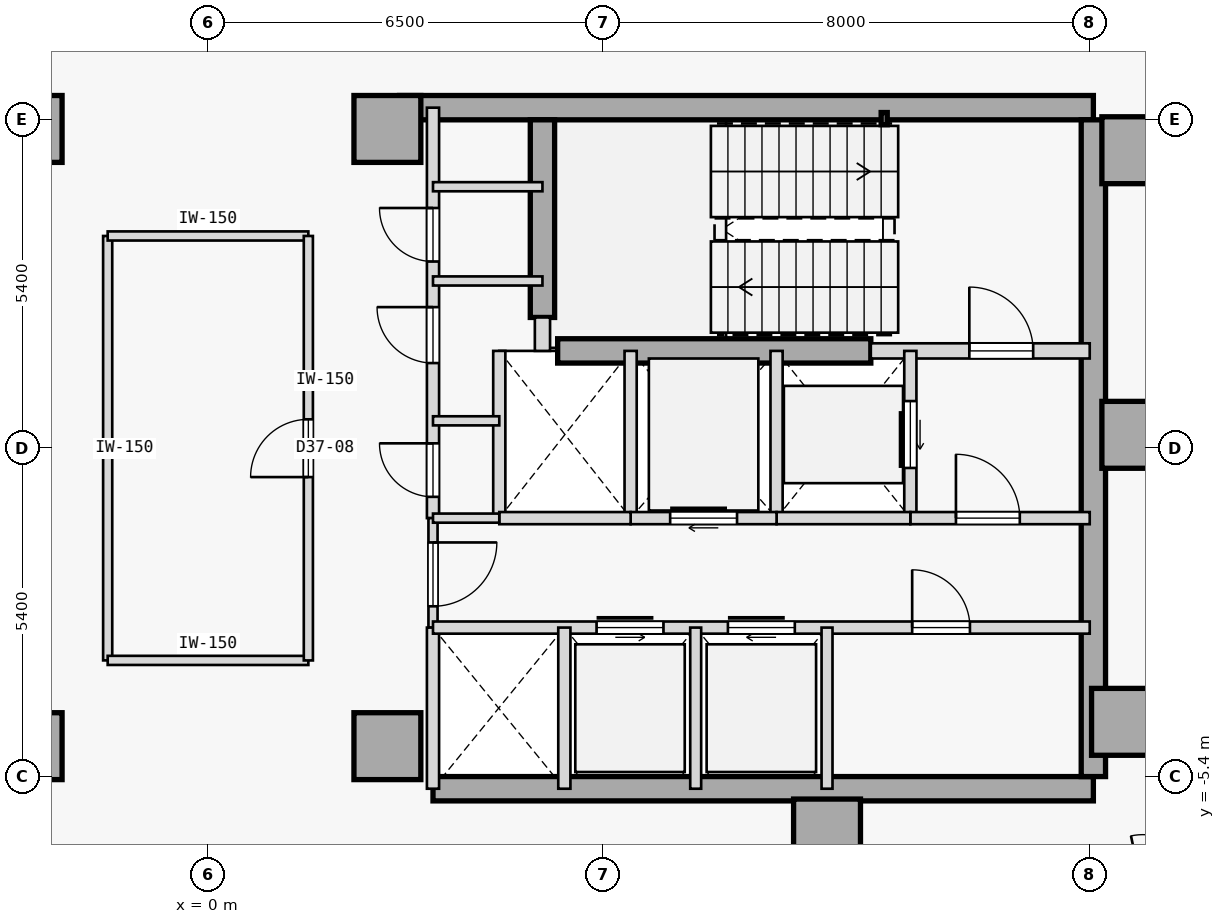
"""IFC4 building model, lengths in metres.
Left out: names, types, materials, properties, quantities, classifications, styles, units other than length and angle.
Written with IfcOpenShell. Run it as: python <this file> out.ifc"""

import sys

from ifc_helpers import new_model, si_unit, direction, frame, frame_2d, origin, origin_2d, place, context, subcontext, project, spatial, rectangle, hollow_rectangle, extrude, element, fill, save


model = new_model("IFC4")
c1 = context("Model", 3, precision=1e-05, world=origin(), true_north=direction((0.0, 1.0)))
c2 = subcontext(c1, "Body", "Model", "MODEL_VIEW")
j1 = project(units=[si_unit("LENGTHUNIT", "METRE"), si_unit("PLANEANGLEUNIT", "RADIAN")], contexts=[c1])
p1 = place(None, origin())
s1 = spatial("IfcSite", under=j1, at=p1, CompositionType="ELEMENT")
p2 = place(p1, origin())
s2 = spatial("IfcBuilding", under=s1, at=p2, CompositionType="ELEMENT")
p3 = place(p2, frame((0.0, 0.0, 147.3)))
s3 = spatial("IfcBuildingStorey", under=s2, at=p3, CompositionType="ELEMENT", Elevation=147.3)
for number, where, z_axis, x_axis in (
    (1, (-2.95, -4.9, 0.0), (0.0, 0.0, 1.0), (1.0, 0.0, 0.0)),
    (2, (-2.95, 5.25, 0.0), (0.0, 0.0, 1.0), (1.0, 0.0, 0.0)),
    (3, (15.25, 4.9, 0.0), (0.0, 0.0, 1.0), (1.0, 0.0, 0.0)),
    (4, (15.25, 0.22, 0.0), (0.0, 0.0, 1.0), (1.0, 0.0, 0.0)),
    (5, (15.08, -4.5, 0.0), (0.0, 0.0, 1.0), (1.0, 0.0, 0.0)),
    (6, (10.18, -6.32, 0.0), (0.0, 0.0, 1.0), (1.0, 0.0, 0.0)),
    (7, (2.95, -4.9, 0.0), (0.0, 0.0, 1.0), (1.0, 0.0, 0.0)),
    (8, (2.95, 5.25, 0.0), (0.0, 0.0, 1.0), (1.0, 0.0, 0.0)),
):
    element("IfcColumn", number, at=place(p3, frame(where, z_axis=z_axis, x_axis=x_axis)), inside=s3, PredefinedType="COLUMN", context=c2, shape_type="SweptSolid", body=[
        extrude(rectangle(XDim=1.1, YDim=1.1, at=origin_2d()), origin(), (0.0, 0.0, 1.0), 4.1),
    ])
p4 = place(p3, frame((3.15, 5.6, 0.0), z_axis=(0.0, 0.0, 1.0), x_axis=(1.0, 0.0, 0.0)))
e9 = element("IfcWall", 9, at=p4, inside=s3, PredefinedType="SHEAR", context=c2, shape_type="SweptSolid", body=[
    extrude(rectangle(XDim=11.41, YDim=0.4, at=frame_2d((5.705, 0.0))), origin(), (0.0, 0.0, 1.0), 3.875),
])
p5 = place(p3, frame((3.7, -5.6, 0.0), z_axis=(0.0, 0.0, 1.0), x_axis=(1.0, 0.0, 0.0)))
e10 = element("IfcWall", 10, at=p5, inside=s3, PredefinedType="SHEAR", context=c2, shape_type="SweptSolid", body=[
    extrude(rectangle(XDim=10.86, YDim=0.4, at=frame_2d((5.43, 0.0))), origin(), (0.0, 0.0, 1.0), 3.875),
])
p6 = place(p3, frame((14.56, -5.4, 0.0), z_axis=(0.0, 0.0, 1.0), x_axis=(0.0, 1.0, 0.0)))
e11 = element("IfcWall", 11, at=p6, inside=s3, PredefinedType="SHEAR", context=c2, shape_type="SweptSolid", body=[
    extrude(rectangle(XDim=10.8, YDim=0.4, at=frame_2d((5.4, 0.0))), origin(), (0.0, 0.0, 1.0), 3.875),
])
p7 = place(p3, frame((5.5, 2.15, 0.0), z_axis=(0.0, 0.0, 1.0), x_axis=(0.0, 1.0, 0.0)))
e12 = element("IfcWall", 12, at=p7, inside=s3, PredefinedType="SHEAR", context=c2, shape_type="SweptSolid", body=[
    extrude(rectangle(XDim=3.25, YDim=0.4, at=frame_2d((1.625, 0.0))), origin(), (0.0, 0.0, 1.0), 3.875),
])
p8 = place(p3, frame((5.75, 1.6, 0.0), z_axis=(0.0, 0.0, 1.0), x_axis=(1.0, 0.0, 0.0)))
e13 = element("IfcWall", 13, at=p8, inside=s3, PredefinedType="SHEAR", context=c2, shape_type="SweptSolid", body=[
    extrude(rectangle(XDim=5.15, YDim=0.4, at=frame_2d((2.575, 0.0))), origin(), (0.0, 0.0, 1.0), 3.875),
])
p9 = place(p3, frame((11.12, 5.42, 0.0), z_axis=(0.0, 0.0, 1.0), x_axis=(1.0, 0.0, 0.0)))
e14 = element("IfcColumn", 14, at=p9, inside=s3, PredefinedType="COLUMN", context=c2, shape_type="SweptSolid", body=[
    extrude(hollow_rectangle(XDim=0.1, YDim=0.2, WallThickness=0.008, at=origin_2d()), origin(), (0.0, 0.0, 1.0), 4.1),
])
p10 = place(p3, frame((10.9, 1.6, 0.0), z_axis=(0.0, 0.0, 1.0), x_axis=(1.0, 0.0, 0.0)))
e15 = element("IfcWall", 15, at=p10, inside=s3, PredefinedType="STANDARD", context=c2, shape_type="SweptSolid", body=[
    extrude(rectangle(XDim=3.6, YDim=0.25, at=frame_2d((1.8, 0.0))), origin(), (0.0, 0.0, 1.0), 3.875),
])
p11 = place(p10, frame((1.62, 0.0, 0.0)))
e16 = element("IfcOpeningElement", 16, at=p11, cuts=e15, PredefinedType="OPENING", context=c2, shape_type="SweptSolid", body=[
    extrude(rectangle(XDim=1.05, YDim=2.15, at=frame_2d((0.525, 1.075))), frame((0.0, 0.135, 0.0), z_axis=(0.0, -1.0, 0.0), x_axis=(1.0, 0.0, 0.0)), (0.0, 0.0, 1.0), 0.27),
])
p12 = place(p3, frame((5.5, 1.6, 0.0), z_axis=(0.0, 0.0, 1.0), x_axis=(0.0, 1.0, 0.0)))
e17 = element("IfcWall", 17, at=p12, inside=s3, PredefinedType="STANDARD", context=c2, shape_type="SweptSolid", body=[
    extrude(rectangle(XDim=0.55, YDim=0.25, at=frame_2d((0.275, 0.0))), origin(), (0.0, 0.0, 1.0), 3.875),
])
p13 = place(p3, frame((3.7, -1.15, 0.0), z_axis=(0.0, 0.0, 1.0), x_axis=(0.0, 1.0, 0.0)))
e18 = element("IfcWall", 18, at=p13, inside=s3, PredefinedType="STANDARD", context=c2, shape_type="SweptSolid", body=[
    extrude(rectangle(XDim=6.75, YDim=0.2, at=frame_2d((3.375, 0.0))), origin(), (0.0, 0.0, 1.0), 3.875),
])
p14 = place(p13, frame((0.35, 0.0, 0.0)))
e19 = element("IfcOpeningElement", 19, at=p14, cuts=e18, PredefinedType="OPENING", context=c2, shape_type="SweptSolid", body=[
    extrude(rectangle(XDim=0.88, YDim=2.15, at=frame_2d((0.44, 1.075))), frame((0.0, 0.11, 0.0), z_axis=(0.0, -1.0, 0.0), x_axis=(1.0, 0.0, 0.0)), (0.0, 0.0, 1.0), 0.22),
])
p15 = place(p13, frame((2.55, 0.0, 0.0)))
e20 = element("IfcOpeningElement", 20, at=p15, cuts=e18, PredefinedType="OPENING", context=c2, shape_type="SweptSolid", body=[
    extrude(rectangle(XDim=0.92, YDim=2.15, at=frame_2d((0.46, 1.075))), frame((0.0, 0.11, 0.0), z_axis=(0.0, -1.0, 0.0), x_axis=(1.0, 0.0, 0.0)), (0.0, 0.0, 1.0), 0.22),
])
p16 = place(p13, frame((4.22, 0.0, 0.0)))
e21 = element("IfcOpeningElement", 21, at=p16, cuts=e18, PredefinedType="OPENING", context=c2, shape_type="SweptSolid", body=[
    extrude(rectangle(XDim=0.88, YDim=2.15, at=frame_2d((0.44, 1.075))), frame((0.0, 0.11, 0.0), z_axis=(0.0, -1.0, 0.0), x_axis=(1.0, 0.0, 0.0)), (0.0, 0.0, 1.0), 0.22),
])
p17 = place(p3, frame((3.7, -2.95, 0.0), z_axis=(0.0, 0.0, 1.0), x_axis=(0.0, 1.0, 0.0)))
e22 = element("IfcWall", 22, at=p17, inside=s3, PredefinedType="PARTITIONING", context=c2, shape_type="SweptSolid", body=[
    extrude(rectangle(XDim=1.8, YDim=0.15, at=frame_2d((0.9, 0.0))), origin(), (0.0, 0.0, 1.0), 3.875),
])
p18 = place(p17, frame((0.35, 0.0, 0.0)))
e23 = element("IfcOpeningElement", 23, at=p18, cuts=e22, PredefinedType="OPENING", context=c2, shape_type="SweptSolid", body=[
    extrude(rectangle(XDim=1.05, YDim=2.18, at=frame_2d((0.525, 1.09))), frame((0.0, 0.085, 0.0), z_axis=(0.0, -1.0, 0.0), x_axis=(1.0, 0.0, 0.0)), (0.0, 0.0, 1.0), 0.17),
])
p19 = place(p3, frame((3.7, -5.6, 0.0), z_axis=(0.0, 0.0, 1.0), x_axis=(0.0, 1.0, 0.0)))
e24 = element("IfcWall", 24, at=p19, inside=s3, PredefinedType="STANDARD", context=c2, shape_type="SweptSolid", body=[
    extrude(rectangle(XDim=2.65, YDim=0.2, at=frame_2d((1.325, 0.0))), origin(), (0.0, 0.0, 1.0), 3.875),
])
p20 = place(p3, frame((11.55, -1.15, 0.0), z_axis=(0.0, 0.0, 1.0), x_axis=(0.0, 1.0, 0.0)))
e25 = element("IfcWall", 25, at=p20, inside=s3, PredefinedType="STANDARD", context=c2, shape_type="SweptSolid", body=[
    extrude(rectangle(XDim=2.75, YDim=0.2, at=frame_2d((1.375, 0.0))), origin(), (0.0, 0.0, 1.0), 3.875),
])
p21 = place(p20, frame((0.825, 0.0, 0.0)))
e26 = element("IfcOpeningElement", 26, at=p21, cuts=e25, PredefinedType="OPENING", context=c2, shape_type="SweptSolid", body=[
    extrude(rectangle(XDim=1.1, YDim=2.15, at=frame_2d((0.55, 1.075))), frame((0.0, 0.11, 0.0), z_axis=(0.0, -1.0, 0.0), x_axis=(1.0, 0.0, 0.0)), (0.0, 0.0, 1.0), 0.22),
])
p22 = place(p3, frame((9.35, -1.15, 0.0), z_axis=(0.0, 0.0, 1.0), x_axis=(0.0, 1.0, 0.0)))
e27 = element("IfcWall", 27, at=p22, inside=s3, PredefinedType="STANDARD", context=c2, shape_type="SweptSolid", body=[
    extrude(rectangle(XDim=2.75, YDim=0.2, at=frame_2d((1.375, 0.0))), origin(), (0.0, 0.0, 1.0), 3.875),
])
p23 = place(p3, frame((11.55, -1.15, 0.0), z_axis=(0.0, 0.0, 1.0), x_axis=(1.0, 0.0, 0.0)))
e28 = element("IfcWall", 28, at=p23, inside=s3, PredefinedType="STANDARD", context=c2, shape_type="SweptSolid", body=[
    extrude(rectangle(XDim=2.95, YDim=0.2, at=frame_2d((1.475, 0.0))), origin(), (0.0, 0.0, 1.0), 3.875),
])
p24 = place(p23, frame((0.75, 0.0, 0.0)))
e29 = element("IfcOpeningElement", 29, at=p24, cuts=e28, PredefinedType="OPENING", context=c2, shape_type="SweptSolid", body=[
    extrude(rectangle(XDim=1.05, YDim=2.18, at=frame_2d((0.525, 1.09))), frame((0.0, 0.11, 0.0), z_axis=(0.0, -1.0, 0.0), x_axis=(1.0, 0.0, 0.0)), (0.0, 0.0, 1.0), 0.22),
])
p25 = place(p3, frame((9.35, -1.15, 0.0), z_axis=(0.0, 0.0, 1.0), x_axis=(1.0, 0.0, 0.0)))
e30 = element("IfcWall", 30, at=p25, inside=s3, PredefinedType="STANDARD", context=c2, shape_type="SweptSolid", body=[
    extrude(rectangle(XDim=2.2, YDim=0.2, at=frame_2d((1.1, 0.0))), origin(), (0.0, 0.0, 1.0), 3.875),
])
p26 = place(p3, frame((6.95, -1.15, 0.0), z_axis=(0.0, 0.0, 1.0), x_axis=(0.0, 1.0, 0.0)))
e31 = element("IfcWall", 31, at=p26, inside=s3, PredefinedType="STANDARD", context=c2, shape_type="SweptSolid", body=[
    extrude(rectangle(XDim=2.75, YDim=0.2, at=frame_2d((1.375, 0.0))), origin(), (0.0, 0.0, 1.0), 3.875),
])
p27 = place(p3, frame((6.95, -1.15, 0.0), z_axis=(0.0, 0.0, 1.0), x_axis=(1.0, 0.0, 0.0)))
e32 = element("IfcWall", 32, at=p27, inside=s3, PredefinedType="STANDARD", context=c2, shape_type="SweptSolid", body=[
    extrude(rectangle(XDim=2.4, YDim=0.2, at=frame_2d((1.2, 0.0))), origin(), (0.0, 0.0, 1.0), 3.875),
])
p28 = place(p27, frame((0.65, 0.0, 0.0)))
e33 = element("IfcOpeningElement", 33, at=p28, cuts=e32, PredefinedType="OPENING", context=c2, shape_type="SweptSolid", body=[
    extrude(rectangle(XDim=1.1, YDim=2.15, at=frame_2d((0.55, 1.075))), frame((0.0, 0.11, 0.0), z_axis=(0.0, -1.0, 0.0), x_axis=(1.0, 0.0, 0.0)), (0.0, 0.0, 1.0), 0.22),
])
p29 = place(p3, frame((4.79, -1.15, 0.0), z_axis=(0.0, 0.0, 1.0), x_axis=(0.0, 1.0, 0.0)))
e34 = element("IfcWall", 34, at=p29, inside=s3, PredefinedType="STANDARD", context=c2, shape_type="SweptSolid", body=[
    extrude(rectangle(XDim=2.75, YDim=0.2, at=frame_2d((1.375, 0.0))), origin(), (0.0, 0.0, 1.0), 3.875),
])
p30 = place(p3, frame((4.79, -1.15, 0.0), z_axis=(0.0, 0.0, 1.0), x_axis=(1.0, 0.0, 0.0)))
e35 = element("IfcWall", 35, at=p30, inside=s3, PredefinedType="STANDARD", context=c2, shape_type="SweptSolid", body=[
    extrude(rectangle(XDim=2.16, YDim=0.2, at=frame_2d((1.08, 0.0))), origin(), (0.0, 0.0, 1.0), 3.875),
])
p31 = place(p3, frame((3.7, -1.15, 0.0), z_axis=(0.0, 0.0, 1.0), x_axis=(1.0, 0.0, 0.0)))
e36 = element("IfcWall", 36, at=p31, inside=s3, PredefinedType="PARTITIONING", context=c2, shape_type="SweptSolid", body=[
    extrude(rectangle(XDim=1.09, YDim=0.15, at=frame_2d((0.545, 0.0))), origin(), (0.0, 0.0, 1.0), 3.875),
])
p32 = place(p3, frame((3.7, -2.95, 0.0), z_axis=(0.0, 0.0, 1.0), x_axis=(1.0, 0.0, 0.0)))
e37 = element("IfcWall", 37, at=p32, inside=s3, PredefinedType="STANDARD", context=c2, shape_type="SweptSolid", body=[
    extrude(rectangle(XDim=10.8, YDim=0.2, at=frame_2d((5.4, 0.0))), origin(), (0.0, 0.0, 1.0), 3.875),
])
p33 = place(p32, frame((2.69, 0.0, 0.0)))
e38 = element("IfcOpeningElement", 38, at=p33, cuts=e37, PredefinedType="OPENING", context=c2, shape_type="SweptSolid", body=[
    extrude(rectangle(XDim=1.1, YDim=2.15, at=frame_2d((0.55, 1.075))), frame((0.0, 0.11, 0.0), z_axis=(0.0, -1.0, 0.0), x_axis=(1.0, 0.0, 0.0)), (0.0, 0.0, 1.0), 0.22),
])
p34 = place(p32, frame((4.85, 0.0, 0.0)))
e39 = element("IfcOpeningElement", 39, at=p34, cuts=e37, PredefinedType="OPENING", context=c2, shape_type="SweptSolid", body=[
    extrude(rectangle(XDim=1.1, YDim=2.15, at=frame_2d((0.55, 1.075))), frame((0.0, 0.11, 0.0), z_axis=(0.0, -1.0, 0.0), x_axis=(1.0, 0.0, 0.0)), (0.0, 0.0, 1.0), 0.22),
])
p35 = place(p32, frame((7.88, 0.0, 0.0)))
e40 = element("IfcOpeningElement", 40, at=p35, cuts=e37, PredefinedType="OPENING", context=c2, shape_type="SweptSolid", body=[
    extrude(rectangle(XDim=0.95, YDim=2.15, at=frame_2d((0.475, 1.075))), frame((0.0, 0.11, 0.0), z_axis=(0.0, -1.0, 0.0), x_axis=(1.0, 0.0, 0.0)), (0.0, 0.0, 1.0), 0.22),
])
p36 = place(p3, frame((5.86, -5.6, 0.0), z_axis=(0.0, 0.0, 1.0), x_axis=(0.0, 1.0, 0.0)))
e41 = element("IfcWall", 41, at=p36, inside=s3, PredefinedType="STANDARD", context=c2, shape_type="SweptSolid", body=[
    extrude(rectangle(XDim=2.65, YDim=0.2, at=frame_2d((1.325, 0.0))), origin(), (0.0, 0.0, 1.0), 3.875),
])
for number, where, z_axis, x_axis in (
    (42, (10.18, -5.6, 0.0), (0.0, 0.0, 1.0), (0.0, 1.0, 0.0)),
    (43, (8.02, -5.6, 0.0), (0.0, 0.0, 1.0), (0.0, 1.0, 0.0)),
):
    element("IfcWall", number, at=place(p3, frame(where, z_axis=z_axis, x_axis=x_axis)), inside=s3, PredefinedType="STANDARD", context=c2, shape_type="SweptSolid", body=[
        extrude(rectangle(XDim=2.65, YDim=0.18, at=frame_2d((1.325, 0.0))), origin(), (0.0, 0.0, 1.0), 3.875),
    ])
p37 = place(p3, frame((3.7, 4.3, 0.0), z_axis=(0.0, 0.0, 1.0), x_axis=(1.0, 0.0, 0.0)))
e44 = element("IfcWall", 44, at=p37, inside=s3, PredefinedType="PARTITIONING", context=c2, shape_type="SweptSolid", body=[
    extrude(rectangle(XDim=1.8, YDim=0.15, at=frame_2d((0.9, 0.0))), origin(), (0.0, 0.0, 1.0), 3.875),
])
p38 = place(p3, frame((3.7, 0.45, 0.0), z_axis=(0.0, 0.0, 1.0), x_axis=(1.0, 0.0, 0.0)))
e45 = element("IfcWall", 45, at=p38, inside=s3, PredefinedType="PARTITIONING", context=c2, shape_type="SweptSolid", body=[
    extrude(rectangle(XDim=1.09, YDim=0.15, at=frame_2d((0.545, 0.0))), origin(), (0.0, 0.0, 1.0), 3.875),
])
p39 = place(p3, frame((3.7, 2.75, 0.0), z_axis=(0.0, 0.0, 1.0), x_axis=(1.0, 0.0, 0.0)))
e46 = element("IfcWall", 46, at=p39, inside=s3, PredefinedType="PARTITIONING", context=c2, shape_type="SweptSolid", body=[
    extrude(rectangle(XDim=1.8, YDim=0.15, at=frame_2d((0.9, 0.0))), origin(), (0.0, 0.0, 1.0), 3.875),
])
p40 = place(p3, frame((-1.65, -3.49, 0.0), z_axis=(0.0, 0.0, 1.0), x_axis=(-3.4979712e-05, 0.999999999388, 0.0)))
e47 = element("IfcWall", 47, at=p40, inside=s3, PredefinedType="PARTITIONING", context=c2, shape_type="SweptSolid", body=[
    extrude(rectangle(XDim=6.979, YDim=0.15, at=frame_2d((3.49, 0.0))), origin(), (0.0, 0.0, 1.0), 3.875),
])
p41 = place(p3, frame((-1.65, -3.49, 0.0), z_axis=(0.0, 0.0, 1.0), x_axis=(0.999999975374, -0.000221926315, 0.0)))
e48 = element("IfcWall", 48, at=p41, inside=s3, PredefinedType="PARTITIONING", context=c2, shape_type="SweptSolid", body=[
    extrude(rectangle(XDim=3.3, YDim=0.15, at=frame_2d((1.65, 0.0))), origin(), (0.0, 0.0, 1.0), 3.875),
])
p42 = place(p3, frame((-1.65, 3.49, 0.0), z_axis=(0.0, 0.0, 1.0), x_axis=(1.0, 0.0, 0.0)))
e49 = element("IfcWall", 49, at=p42, inside=s3, PredefinedType="PARTITIONING", context=c2, shape_type="SweptSolid", body=[
    extrude(rectangle(XDim=3.3, YDim=0.15, at=frame_2d((1.65, 0.0))), origin(), (0.0, 0.0, 1.0), 3.875),
])
p43 = place(p3, frame((1.65, -3.49, 0.0), z_axis=(0.0, 0.0, 1.0), x_axis=(-6.9952083e-05, 0.999999997553, 0.0)))
e50 = element("IfcWall", 50, at=p43, inside=s3, PredefinedType="PARTITIONING", context=c2, shape_type="SweptSolid", body=[
    extrude(rectangle(XDim=6.98, YDim=0.15, at=frame_2d((3.49, 0.0))), origin(), (0.0, 0.0, 1.0), 3.875),
])
p44 = place(p43, frame((3.015, 0.0, 0.0)))
e51 = element("IfcOpeningElement", 51, at=p44, cuts=e50, PredefinedType="OPENING", context=c2, shape_type="SweptSolid", body=[
    extrude(rectangle(XDim=0.95, YDim=2.15, at=frame_2d((0.475, 1.075))), frame((0.0, 0.085, 0.0), z_axis=(0.0, -1.0, 0.0), x_axis=(1.0, 0.0, 0.0)), (0.0, 0.0, 1.0), 0.17),
])
p45 = place(p3, frame((12.22, -7.976, 0.0), z_axis=(0.0, 0.0, 1.0), x_axis=(0.978150468613, 0.207898198049, 0.0)))
e52 = element("IfcWall", 52, at=p45, inside=s3, PredefinedType="PARTITIONING", context=c2, shape_type="SweptSolid", body=[
    extrude(rectangle(XDim=7.403, YDim=0.15, at=frame_2d((3.702, 0.0))), origin(), (0.0, 0.0, 1.0), 3.875),
])
p46 = place(p45, frame((3.227, 0.0, 0.0)))
e53 = element("IfcOpeningElement", 53, at=p46, cuts=e52, PredefinedType="OPENING", context=c2, shape_type="SweptSolid", body=[
    extrude(rectangle(XDim=0.95, YDim=2.15, at=frame_2d((0.475, 1.075))), frame((0.0, 0.085, 0.0), z_axis=(0.0, -1.0, 0.0), x_axis=(1.0, 0.0, 0.0)), (0.0, 0.0, 1.0), 0.17),
])
p47 = place(p11, origin())
e54 = element("IfcDoor", 54, at=p47, inside=s3, OperationType="SINGLE_SWING_LEFT", PredefinedType="DOOR", context=c2, shape_type="SweptSolid", body=[
    extrude(rectangle(XDim=1.05, YDim=2.15, at=frame_2d((0.525, 1.075))), frame((0.0, 0.025, 0.0), z_axis=(0.0, -1.0, 0.0), x_axis=(1.0, 0.0, 0.0)), (0.0, 0.0, 1.0), 0.05),
])
fill(e16, e54)
p48 = place(p24, origin())
e55 = element("IfcDoor", 55, at=p48, inside=s3, OperationType="SINGLE_SWING_LEFT", PredefinedType="DOOR", context=c2, shape_type="SweptSolid", body=[
    extrude(rectangle(XDim=1.05, YDim=2.18, at=frame_2d((0.525, 1.09))), frame((0.0, 0.025, 0.0), z_axis=(0.0, -1.0, 0.0), x_axis=(1.0, 0.0, 0.0)), (0.0, 0.0, 1.0), 0.05),
])
fill(e29, e55)
p49 = place(p18, frame((1.05, 0.0, 0.0), z_axis=(0.0, 0.0, 1.0), x_axis=(-1.0, 0.0, 0.0)))
e56 = element("IfcDoor", 56, at=p49, inside=s3, OperationType="SINGLE_SWING_RIGHT", PredefinedType="DOOR", context=c2, shape_type="SweptSolid", body=[
    extrude(rectangle(XDim=1.05, YDim=2.18, at=frame_2d((0.525, 1.09))), frame((0.0, 0.025, 0.0), z_axis=(0.0, -1.0, 0.0), x_axis=(1.0, 0.0, 0.0)), (0.0, 0.0, 1.0), 0.05),
])
fill(e23, e56)
p50 = place(p21, origin())
e57 = element("IfcDoor", 57, at=p50, inside=s3, OperationType="SLIDING_TO_RIGHT", PredefinedType="DOOR", context=c2, shape_type="SweptSolid", body=[
    extrude(rectangle(XDim=1.1, YDim=2.15, at=frame_2d((0.55, 1.075))), frame((0.0, 0.025, 0.0), z_axis=(0.0, -1.0, 0.0), x_axis=(1.0, 0.0, 0.0)), (0.0, 0.0, 1.0), 0.05),
])
fill(e26, e57)
p51 = place(p28, origin())
e58 = element("IfcDoor", 58, at=p51, inside=s3, OperationType="SLIDING_TO_RIGHT", PredefinedType="DOOR", context=c2, shape_type="SweptSolid", body=[
    extrude(rectangle(XDim=1.1, YDim=2.15, at=frame_2d((0.55, 1.075))), frame((0.0, 0.025, 0.0), z_axis=(0.0, -1.0, 0.0), x_axis=(1.0, 0.0, 0.0)), (0.0, 0.0, 1.0), 0.05),
])
fill(e33, e58)
p52 = place(p33, origin())
e59 = element("IfcDoor", 59, at=p52, inside=s3, OperationType="SLIDING_TO_LEFT", PredefinedType="DOOR", context=c2, shape_type="SweptSolid", body=[
    extrude(rectangle(XDim=1.1, YDim=2.15, at=frame_2d((0.55, 1.075))), frame((0.0, 0.025, 0.0), z_axis=(0.0, -1.0, 0.0), x_axis=(1.0, 0.0, 0.0)), (0.0, 0.0, 1.0), 0.05),
])
fill(e38, e59)
p53 = place(p34, origin())
e60 = element("IfcDoor", 60, at=p53, inside=s3, OperationType="SLIDING_TO_RIGHT", PredefinedType="DOOR", context=c2, shape_type="SweptSolid", body=[
    extrude(rectangle(XDim=1.1, YDim=2.15, at=frame_2d((0.55, 1.075))), frame((0.0, 0.025, 0.0), z_axis=(0.0, -1.0, 0.0), x_axis=(1.0, 0.0, 0.0)), (0.0, 0.0, 1.0), 0.05),
])
fill(e39, e60)
p54 = place(p35, origin())
e61 = element("IfcDoor", 61, at=p54, inside=s3, OperationType="SINGLE_SWING_LEFT", PredefinedType="DOOR", context=c2, shape_type="SweptSolid", body=[
    extrude(rectangle(XDim=0.95, YDim=2.15, at=frame_2d((0.475, 1.075))), frame((0.0, 0.025, 0.0), z_axis=(0.0, -1.0, 0.0), x_axis=(1.0, 0.0, 0.0)), (0.0, 0.0, 1.0), 0.05),
])
fill(e40, e61)
p55 = place(p14, origin())
e62 = element("IfcDoor", 62, at=p55, inside=s3, OperationType="SINGLE_SWING_RIGHT", PredefinedType="DOOR", context=c2, shape_type="SweptSolid", body=[
    extrude(rectangle(XDim=0.88, YDim=2.15, at=frame_2d((0.44, 1.075))), frame((0.0, 0.025, 0.0), z_axis=(0.0, -1.0, 0.0), x_axis=(1.0, 0.0, 0.0)), (0.0, 0.0, 1.0), 0.05),
])
fill(e19, e62)
p56 = place(p15, origin())
e63 = element("IfcDoor", 63, at=p56, inside=s3, OperationType="SINGLE_SWING_RIGHT", PredefinedType="DOOR", context=c2, shape_type="SweptSolid", body=[
    extrude(rectangle(XDim=0.92, YDim=2.15, at=frame_2d((0.46, 1.075))), frame((0.0, 0.025, 0.0), z_axis=(0.0, -1.0, 0.0), x_axis=(1.0, 0.0, 0.0)), (0.0, 0.0, 1.0), 0.05),
])
fill(e20, e63)
p57 = place(p16, origin())
e64 = element("IfcDoor", 64, at=p57, inside=s3, OperationType="SINGLE_SWING_RIGHT", PredefinedType="DOOR", context=c2, shape_type="SweptSolid", body=[
    extrude(rectangle(XDim=0.88, YDim=2.15, at=frame_2d((0.44, 1.075))), frame((0.0, 0.025, 0.0), z_axis=(0.0, -1.0, 0.0), x_axis=(1.0, 0.0, 0.0)), (0.0, 0.0, 1.0), 0.05),
])
fill(e21, e64)
p58 = place(p44, origin())
e65 = element("IfcDoor", 65, at=p58, inside=s3, OperationType="SINGLE_SWING_LEFT", PredefinedType="DOOR", context=c2, shape_type="SweptSolid", body=[
    extrude(rectangle(XDim=0.95, YDim=2.15, at=frame_2d((0.475, 1.075))), frame((0.0, 0.025, 0.0), z_axis=(0.0, -1.0, 0.0), x_axis=(1.0, 0.0, 0.0)), (0.0, 0.0, 1.0), 0.05),
])
fill(e51, e65)
save(model, sys.argv[1])
